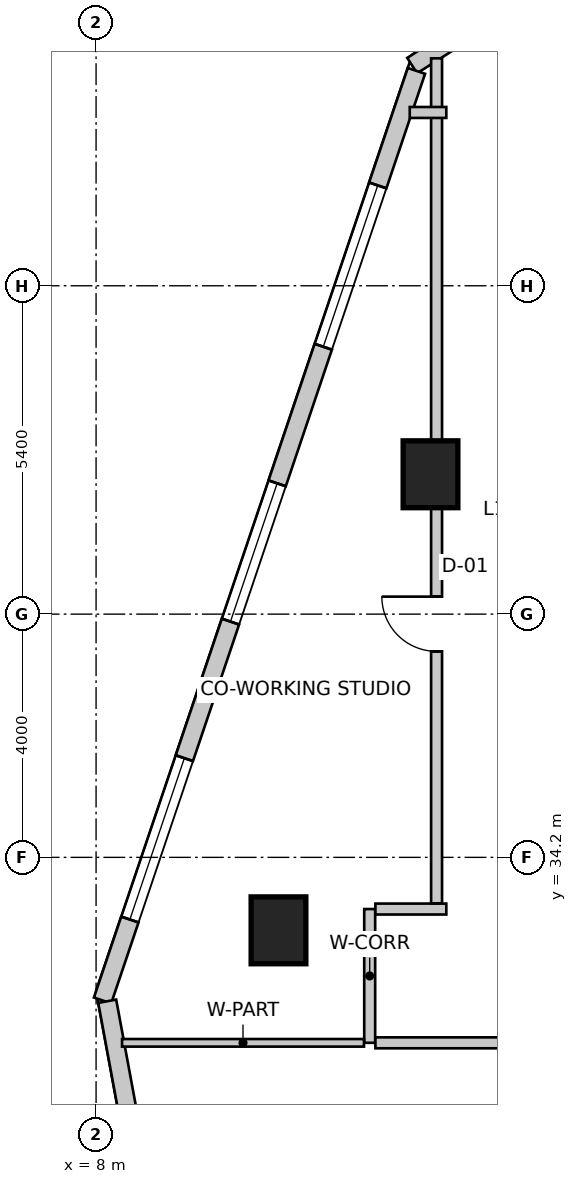
"""IFC4 building model, lengths in metres.
Left out: names, types, materials, properties, quantities, classifications, styles, units other than length and angle.
Written with IfcOpenShell. Run it as: python <this file> out.ifc"""

import sys

from ifc_helpers import new_model, si_unit, direction, frame, frame_2d, origin, origin_2d, place, context, subcontext, project, spatial, rectangle, extrude, source, transform, mapped, element, fill, save


model = new_model("IFC4")
c1 = context("Model", 3, precision=1e-05, world=origin(), true_north=direction((0.0, 1.0)))
c2 = subcontext(c1, "Body", "Model", "MODEL_VIEW")
j1 = project(units=[si_unit("LENGTHUNIT", "METRE"), si_unit("PLANEANGLEUNIT", "RADIAN")], contexts=[c1])
p1 = place(None, origin())
s1 = spatial("IfcSite", under=j1, at=p1, CompositionType="ELEMENT")
p2 = place(p1, origin())
s2 = spatial("IfcBuilding", under=s1, at=p2, CompositionType="ELEMENT")
p3 = place(p2, frame((0.0, 0.0, 75.0)))
s3 = spatial("IfcBuildingStorey", under=s2, at=p3, CompositionType="ELEMENT", Elevation=75.0)
m1 = source(origin(), c2, "Body", "SweptSolid", [
    extrude(rectangle(XDim=0.9, YDim=1.1, at=origin_2d()), origin(), (0.0, 0.0, 1.0), 4.0),
])
for number, where, z_axis, x_axis in (
    (1, (11.0, 33.0, 0.0), (0.0, 0.0, 1.0), (1.0, 0.0, 0.0)),
    (2, (13.5, 40.5, 0.0), (0.0, 0.0, 1.0), (1.0, 0.0, 0.0)),
):
    element("IfcColumn", number, at=place(p3, frame(where, z_axis=z_axis, x_axis=x_axis)), inside=s3, PredefinedType="COLUMN", context=c2, shape_type="MappedRepresentation", body=[
        mapped(m1, transform((0.0, 0.0, 0.0), scale=1.0)),
    ])
p4 = place(p3, frame((21.875, 52.742, 0.0), z_axis=(0.0, 0.0, 1.0), x_axis=(-0.843662465249, -0.536873956092, 0.0)))
e3 = element("IfcWall", 3, at=p4, inside=s3, PredefinedType="SOLIDWALL", context=c2, shape_type="SweptSolid", body=[
    extrude(rectangle(XDim=10.284, YDim=0.3, at=frame_2d((5.142, 0.0))), origin(), (0.0, 0.0, 1.0), 3.75),
])
m2 = source(origin(), c2, "Body", "SweptSolid", [
    extrude(rectangle(XDim=0.9, YDim=1.6, at=frame_2d((0.45, 0.8))), frame((0.0, 0.16, 0.0), z_axis=(0.0, -1.0, 0.0), x_axis=(1.0, 0.0, 0.0)), (0.0, 0.0, 1.0), 0.32),
])
p5 = place(p4, frame((0.629, 0.0, 0.85)))
e4 = element("IfcOpeningElement", 4, at=p5, cuts=e3, PredefinedType="OPENING", context=c2, shape_type="MappedRepresentation", body=[
    mapped(m2, transform((0.0, 0.0, 0.0), scale=1.0)),
])
m3 = source(origin(), c2, "Body", "SweptSolid", [
    extrude(rectangle(XDim=2.4, YDim=2.2, at=frame_2d((1.2, 1.1))), frame((0.0, 0.16, 0.0), z_axis=(0.0, -1.0, 0.0), x_axis=(1.0, 0.0, 0.0)), (0.0, 0.0, 1.0), 0.32),
])
p6 = place(p4, frame((3.542, 0.0, 0.85)))
e5 = element("IfcOpeningElement", 5, at=p6, cuts=e3, PredefinedType="OPENING", context=c2, shape_type="MappedRepresentation", body=[
    mapped(m3, transform((0.0, 0.0, 0.0), scale=1.0)),
])
m4 = source(origin(), c2, "Body", "SweptSolid", [
    extrude(rectangle(XDim=1.5, YDim=1.8, at=frame_2d((0.75, 0.9))), frame((0.0, 0.16, 0.0), z_axis=(0.0, -1.0, 0.0), x_axis=(1.0, 0.0, 0.0)), (0.0, 0.0, 1.0), 0.32),
])
p7 = place(p4, frame((7.903, 0.0, 0.85)))
e6 = element("IfcOpeningElement", 6, at=p7, cuts=e3, PredefinedType="OPENING", context=c2, shape_type="MappedRepresentation", body=[
    mapped(m4, transform((0.0, 0.0, 0.0), scale=1.0)),
])
p8 = place(p3, frame((13.269, 47.134, 0.0), z_axis=(0.0, 0.0, 1.0), x_axis=(-0.319920423265, -0.947444416722, 0.0)))
e7 = element("IfcWall", 7, at=p8, inside=s3, PredefinedType="SOLIDWALL", context=c2, shape_type="SweptSolid", body=[
    extrude(rectangle(XDim=16.135, YDim=0.3, at=frame_2d((8.067, 0.0))), origin(), (0.0, 0.0, 1.0), 3.75),
])
m5 = source(origin(), c2, "Body", "SweptSolid", [
    extrude(rectangle(XDim=2.8, YDim=2.4, at=frame_2d((1.4, 1.2))), frame((0.0, 0.16, 0.0), z_axis=(0.0, -1.0, 0.0), x_axis=(1.0, 0.0, 0.0)), (0.0, 0.0, 1.0), 0.32),
])
p9 = place(p8, frame((1.988, 0.0, 0.85)))
e8 = element("IfcOpeningElement", 8, at=p9, cuts=e7, PredefinedType="OPENING", context=c2, shape_type="MappedRepresentation", body=[
    mapped(m5, transform((0.0, 0.0, 0.0), scale=1.0)),
])
p10 = place(p8, frame((7.159, 0.0, 0.85)))
e9 = element("IfcOpeningElement", 9, at=p10, cuts=e7, PredefinedType="OPENING", context=c2, shape_type="MappedRepresentation", body=[
    mapped(m3, transform((0.0, 0.0, 0.0), scale=1.0)),
])
p11 = place(p8, frame((11.93, 0.0, 0.85)))
e10 = element("IfcOpeningElement", 10, at=p11, cuts=e7, PredefinedType="OPENING", context=c2, shape_type="MappedRepresentation", body=[
    mapped(m5, transform((0.0, 0.0, 0.0), scale=1.0)),
])
p12 = place(p3, frame((8.183, 31.833, 0.0), z_axis=(0.0, 0.0, 1.0), x_axis=(0.18216364648, -0.983268226834, 0.0)))
e11 = element("IfcWall", 11, at=p12, inside=s3, PredefinedType="SOLIDWALL", context=c2, shape_type="SweptSolid", body=[
    extrude(rectangle(XDim=26.678, YDim=0.3, at=frame_2d((13.339, 0.0))), origin(), (0.0, 0.0, 1.0), 3.75),
])
p13 = place(p12, frame((3.152, 0.0, 0.85)))
e12 = element("IfcOpeningElement", 12, at=p13, cuts=e11, PredefinedType="OPENING", context=c2, shape_type="MappedRepresentation", body=[
    mapped(m3, transform((0.0, 0.0, 0.0), scale=1.0)),
])
p14 = place(p12, frame((9.076, 0.0, 0.85)))
e13 = element("IfcOpeningElement", 13, at=p14, cuts=e11, PredefinedType="OPENING", context=c2, shape_type="MappedRepresentation", body=[
    mapped(m3, transform((0.0, 0.0, 0.0), scale=1.0)),
])
p15 = place(p12, frame((13.653, 0.0, 0.85)))
e14 = element("IfcOpeningElement", 14, at=p15, cuts=e11, PredefinedType="OPENING", context=c2, shape_type="MappedRepresentation", body=[
    mapped(m3, transform((0.0, 0.0, 0.0), scale=1.0)),
])
p16 = place(p12, frame((18.411, 0.0, 0.85)))
e15 = element("IfcOpeningElement", 15, at=p16, cuts=e11, PredefinedType="OPENING", context=c2, shape_type="MappedRepresentation", body=[
    mapped(m3, transform((0.0, 0.0, 0.0), scale=1.0)),
])
p17 = place(p12, frame((22.709, 0.0, 0.85)))
e16 = element("IfcOpeningElement", 16, at=p17, cuts=e11, PredefinedType="OPENING", context=c2, shape_type="MappedRepresentation", body=[
    mapped(m5, transform((0.0, 0.0, 0.0), scale=1.0)),
])
p18 = place(p3, frame((12.5, 31.15, 0.0), z_axis=(0.0, 0.0, 1.0), x_axis=(0.0, 1.0, 0.0)))
e17 = element("IfcWall", 17, at=p18, inside=s3, PredefinedType="PARTITIONING", context=c2, shape_type="SweptSolid", body=[
    extrude(rectangle(XDim=2.2, YDim=0.18, at=frame_2d((1.1, 0.0))), origin(), (0.0, 0.0, 1.0), 3.335),
])
p19 = place(p3, frame((12.594, 33.35, 0.0), z_axis=(0.0, 0.0, 1.0), x_axis=(1.0, 0.0, 0.0)))
e18 = element("IfcWall", 18, at=p19, inside=s3, PredefinedType="PARTITIONING", context=c2, shape_type="SweptSolid", body=[
    extrude(rectangle(XDim=1.166, YDim=0.18, at=frame_2d((0.583, 0.0))), origin(), (0.0, 0.0, 1.0), 3.75),
])
p20 = place(p3, frame((17.96, 31.15, 0.0), z_axis=(0.0, 0.0, 1.0), x_axis=(-1.0, 0.0, 0.0)))
e19 = element("IfcWall", 19, at=p20, inside=s3, PredefinedType="PARTITIONING", context=c2, shape_type="SweptSolid", body=[
    extrude(rectangle(XDim=5.366, YDim=0.18, at=frame_2d((2.683, 0.0))), origin(), (0.0, 0.0, 1.0), 3.335),
])
p21 = place(p3, frame((13.6, 33.444, 0.0), z_axis=(0.0, 0.0, 1.0), x_axis=(0.0, 1.0, 0.0)))
e20 = element("IfcWall", 20, at=p21, inside=s3, PredefinedType="PARTITIONING", context=c2, shape_type="SweptSolid", body=[
    extrude(rectangle(XDim=13.896, YDim=0.18, at=frame_2d((6.948, 0.0))), origin(), (0.0, 0.0, 1.0), 2.892),
])
m6 = source(origin(), c2, "Body", "SweptSolid", [
    extrude(rectangle(XDim=0.9, YDim=2.15, at=frame_2d((0.45, 1.075))), frame((0.0, 0.1, 0.0), z_axis=(0.0, -1.0, 0.0), x_axis=(1.0, 0.0, 0.0)), (0.0, 0.0, 1.0), 0.2),
])
p22 = place(p21, frame((4.144, 0.0, 0.0)))
e21 = element("IfcOpeningElement", 21, at=p22, cuts=e20, PredefinedType="OPENING", context=c2, shape_type="MappedRepresentation", body=[
    mapped(m6, transform((0.0, 0.0, 0.0), scale=1.0)),
])
p23 = place(p3, frame((13.76, 46.45, 0.0), z_axis=(0.0, 0.0, 1.0), x_axis=(-1.0, 0.0, 0.0)))
e22 = element("IfcWall", 22, at=p23, inside=s3, PredefinedType="PARTITIONING", context=c2, shape_type="SweptSolid", body=[
    extrude(rectangle(XDim=0.601, YDim=0.18, at=frame_2d((0.301, 0.0))), origin(), (0.0, 0.0, 1.0), 3.75),
])
p24 = place(p3, frame((12.406, 31.15, 0.0), z_axis=(0.0, 0.0, 1.0), x_axis=(-1.0, 0.0, 0.0)))
e23 = element("IfcWall", 23, at=p24, inside=s3, PredefinedType="PARTITIONING", context=c2, shape_type="SweptSolid", body=[
    extrude(rectangle(XDim=3.979, YDim=0.125, at=frame_2d((1.99, 0.0))), origin(), (0.0, 0.0, 1.0), 2.892),
])
m7 = source(origin(), c2, "Body", "SweptSolid", [
    extrude(rectangle(XDim=2.8, YDim=2.4, at=frame_2d((1.4, 1.2))), frame((0.0, -0.015, 0.0), z_axis=(0.0, -1.0, 0.0), x_axis=(1.0, 0.0, 0.0)), (0.0, 0.0, 1.0), 0.06),
])
p25 = place(p9, origin())
e24 = element("IfcWindow", 24, at=p25, inside=s3, PartitioningType="SINGLE_PANEL", PredefinedType="WINDOW", context=c2, shape_type="MappedRepresentation", body=[
    mapped(m7, transform((0.0, 0.0, 0.0), scale=1.0)),
])
fill(e8, e24)
m8 = source(origin(), c2, "Body", "SweptSolid", [
    extrude(rectangle(XDim=2.4, YDim=2.2, at=frame_2d((1.2, 1.1))), frame((0.0, -0.015, 0.0), z_axis=(0.0, -1.0, 0.0), x_axis=(1.0, 0.0, 0.0)), (0.0, 0.0, 1.0), 0.06),
])
p26 = place(p10, origin())
e25 = element("IfcWindow", 25, at=p26, inside=s3, PartitioningType="SINGLE_PANEL", PredefinedType="WINDOW", context=c2, shape_type="MappedRepresentation", body=[
    mapped(m8, transform((0.0, 0.0, 0.0), scale=1.0)),
])
fill(e9, e25)
p27 = place(p11, origin())
e26 = element("IfcWindow", 26, at=p27, inside=s3, PartitioningType="SINGLE_PANEL", PredefinedType="WINDOW", context=c2, shape_type="MappedRepresentation", body=[
    mapped(m7, transform((0.0, 0.0, 0.0), scale=1.0)),
])
fill(e10, e26)
m9 = source(origin(), c2, "Body", "SweptSolid", [
    extrude(rectangle(XDim=0.9, YDim=2.15, at=frame_2d((0.45, 1.075))), frame((0.0, 0.025, 0.0), z_axis=(0.0, -1.0, 0.0), x_axis=(1.0, 0.0, 0.0)), (0.0, 0.0, 1.0), 0.05),
])
p28 = place(p22, origin())
e27 = element("IfcDoor", 27, at=p28, inside=s3, OperationType="SINGLE_SWING_RIGHT", PredefinedType="DOOR", context=c2, shape_type="MappedRepresentation", body=[
    mapped(m9, transform((0.0, 0.0, 0.0), scale=1.0)),
])
fill(e21, e27)
save(model, sys.argv[1])
